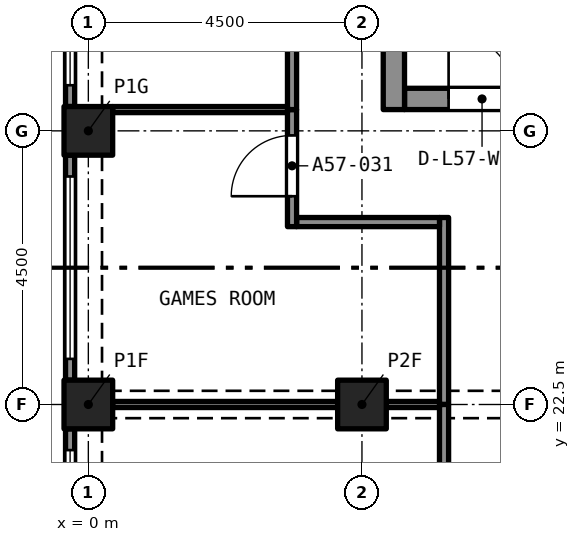
"""IFC4 building model, lengths in metres.
Left out: names, types, materials, properties, quantities, classifications, styles, units other than length and angle.
Written with IfcOpenShell. Run it as: python <this file> out.ifc"""

import sys

from ifc_helpers import new_model, si_unit, direction, frame, frame_2d, origin, origin_2d, place, context, subcontext, project, spatial, rectangle, extrude, element, fill, save


model = new_model("IFC4")
c1 = context("Model", 3, precision=1e-05, world=origin(), true_north=direction((0.0, 1.0)))
c2 = subcontext(c1, "Body", "Model", "MODEL_VIEW")
j1 = project(units=[si_unit("LENGTHUNIT", "METRE"), si_unit("PLANEANGLEUNIT", "RADIAN")], contexts=[c1])
p1 = place(None, origin())
s1 = spatial("IfcSite", under=j1, at=p1, CompositionType="ELEMENT")
p2 = place(p1, origin())
s2 = spatial("IfcBuilding", under=s1, at=p2, CompositionType="ELEMENT")
p3 = place(p2, frame((0.0, 0.0, 206.895)))
s3 = spatial("IfcBuildingStorey", under=s2, at=p3, CompositionType="ELEMENT", Elevation=206.895)
for number, where, z_axis, x_axis in (
    (1, (0.0, 22.5, 0.0), (0.0, 0.0, 1.0), (1.0, 0.0, 0.0)),
    (2, (4.5, 22.5, 0.0), (0.0, 0.0, 1.0), (1.0, 0.0, 0.0)),
    (3, (0.0, 27.0, 0.0), (0.0, 0.0, 1.0), (1.0, 0.0, 0.0)),
):
    element("IfcColumn", number, at=place(p3, frame(where, z_axis=z_axis, x_axis=x_axis)), inside=s3, PredefinedType="COLUMN", context=c2, shape_type="SweptSolid", body=[
        extrude(rectangle(XDim=0.8, YDim=0.8, at=origin_2d()), origin(), (0.0, 0.0, 1.0), 3.2),
    ])
p4 = place(p3, frame((5.2, 27.525, 0.0), z_axis=(0.0, 0.0, 1.0), x_axis=(1.0, 0.0, 0.0)))
e4 = element("IfcWall", 4, at=p4, inside=s3, PredefinedType="SOLIDWALL", context=c2, shape_type="SweptSolid", body=[
    extrude(rectangle(XDim=7.6, YDim=0.35, at=frame_2d((3.8, 0.0))), origin(), (0.0, 0.0, 1.0), 3.2),
])
p5 = place(p4, frame((0.725, 0.0, 0.0)))
e5 = element("IfcOpeningElement", 5, at=p5, cuts=e4, PredefinedType="OPENING", context=c2, shape_type="SweptSolid", body=[
    extrude(rectangle(XDim=1.1, YDim=2.1, at=frame_2d((0.55, 1.05))), frame((0.0, 0.185, 0.0), z_axis=(0.0, -1.0, 0.0), x_axis=(1.0, 0.0, 0.0)), (0.0, 0.0, 1.0), 0.37),
])
p6 = place(p4, frame((3.25, 0.0, 0.0)))
e6 = element("IfcOpeningElement", 6, at=p6, cuts=e4, PredefinedType="OPENING", context=c2, shape_type="SweptSolid", body=[
    extrude(rectangle(XDim=1.1, YDim=2.1, at=frame_2d((0.55, 1.05))), frame((0.0, 0.185, 0.0), z_axis=(0.0, -1.0, 0.0), x_axis=(1.0, 0.0, 0.0)), (0.0, 0.0, 1.0), 0.37),
])
p7 = place(p4, frame((5.775, 0.0, 0.0)))
e7 = element("IfcOpeningElement", 7, at=p7, cuts=e4, PredefinedType="OPENING", context=c2, shape_type="SweptSolid", body=[
    extrude(rectangle(XDim=1.1, YDim=2.1, at=frame_2d((0.55, 1.05))), frame((0.0, 0.185, 0.0), z_axis=(0.0, -1.0, 0.0), x_axis=(1.0, 0.0, 0.0)), (0.0, 0.0, 1.0), 0.37),
])
p8 = place(p3, frame((5.025, 27.35, 0.0), z_axis=(0.0, 0.0, 1.0), x_axis=(0.0, 1.0, 0.0)))
e8 = element("IfcWall", 8, at=p8, inside=s3, PredefinedType="SOLIDWALL", context=c2, shape_type="SweptSolid", body=[
    extrude(rectangle(XDim=12.8, YDim=0.35, at=frame_2d((6.4, 0.0))), origin(), (0.0, 0.0, 1.0), 3.2),
])
p9 = place(p8, frame((8.6, 0.0, 0.0)))
e9 = element("IfcOpeningElement", 9, at=p9, cuts=e8, PredefinedType="OPENING", context=c2, shape_type="SweptSolid", body=[
    extrude(rectangle(XDim=1.2, YDim=2.1, at=frame_2d((0.6, 1.05))), frame((0.0, 0.185, 0.0), z_axis=(0.0, -1.0, 0.0), x_axis=(1.0, 0.0, 0.0)), (0.0, 0.0, 1.0), 0.37),
])
p10 = place(p3, frame((-0.3, 27.4, 0.0), z_axis=(0.0, 0.0, 1.0), x_axis=(0.0, 1.0, 0.0)))
e10 = element("IfcWall", 10, at=p10, inside=s3, PredefinedType="SOLIDWALL", context=c2, shape_type="SweptSolid", body=[
    extrude(rectangle(XDim=3.7, YDim=0.15, at=frame_2d((1.85, 0.0))), origin(), (0.0, 0.0, 1.0), 3.2),
])
p11 = place(p10, frame((0.35, 0.0, 0.45)))
e11 = element("IfcOpeningElement", 11, at=p11, cuts=e10, PredefinedType="OPENING", context=c2, shape_type="SweptSolid", body=[
    extrude(rectangle(XDim=3.0, YDim=1.95, at=frame_2d((1.5, 0.975))), frame((0.0, 0.085, 0.0), z_axis=(0.0, -1.0, 0.0), x_axis=(1.0, 0.0, 0.0)), (0.0, 0.0, 1.0), 0.17),
])
p12 = place(p3, frame((-0.3, 22.9, 0.0), z_axis=(0.0, 0.0, 1.0), x_axis=(0.0, 1.0, 0.0)))
e12 = element("IfcWall", 12, at=p12, inside=s3, PredefinedType="SOLIDWALL", context=c2, shape_type="SweptSolid", body=[
    extrude(rectangle(XDim=3.7, YDim=0.15, at=frame_2d((1.85, 0.0))), origin(), (0.0, 0.0, 1.0), 3.2),
])
p13 = place(p12, frame((0.35, 0.0, 0.45)))
e13 = element("IfcOpeningElement", 13, at=p13, cuts=e12, PredefinedType="OPENING", context=c2, shape_type="SweptSolid", body=[
    extrude(rectangle(XDim=3.0, YDim=1.95, at=frame_2d((1.5, 0.975))), frame((0.0, 0.085, 0.0), z_axis=(0.0, -1.0, 0.0), x_axis=(1.0, 0.0, 0.0)), (0.0, 0.0, 1.0), 0.17),
])
p14 = place(p3, frame((-0.3, 18.4, 0.0), z_axis=(0.0, 0.0, 1.0), x_axis=(0.0, 1.0, 0.0)))
e14 = element("IfcWall", 14, at=p14, inside=s3, PredefinedType="SOLIDWALL", context=c2, shape_type="SweptSolid", body=[
    extrude(rectangle(XDim=3.7, YDim=0.15, at=frame_2d((1.85, 0.0))), origin(), (0.0, 0.0, 1.0), 3.2),
])
p15 = place(p14, frame((0.35, 0.0, 0.45)))
e15 = element("IfcOpeningElement", 15, at=p15, cuts=e14, PredefinedType="OPENING", context=c2, shape_type="SweptSolid", body=[
    extrude(rectangle(XDim=3.0, YDim=1.95, at=frame_2d((1.5, 0.975))), frame((0.0, 0.085, 0.0), z_axis=(0.0, -1.0, 0.0), x_axis=(1.0, 0.0, 0.0)), (0.0, 0.0, 1.0), 0.17),
])
p16 = place(p3, frame((5.85, 22.5, 0.0), z_axis=(0.0, 0.0, 1.0), x_axis=(0.0, 1.0, 0.0)))
e16 = element("IfcWall", 16, at=p16, inside=s3, PredefinedType="PARTITIONING", context=c2, shape_type="SweptSolid", body=[
    extrude(rectangle(XDim=3.075, YDim=0.15, at=frame_2d((1.538, 0.0))), origin(), (0.0, 0.0, 1.0), 2.9),
])
p17 = place(p3, frame((3.425, 25.5, 0.0), z_axis=(0.0, 0.0, 1.0), x_axis=(1.0, 0.0, 0.0)))
e17 = element("IfcWall", 17, at=p17, inside=s3, PredefinedType="PARTITIONING", context=c2, shape_type="SweptSolid", body=[
    extrude(rectangle(XDim=2.35, YDim=0.15, at=frame_2d((1.175, 0.0))), origin(), (0.0, 0.0, 1.0), 2.9),
])
p18 = place(p3, frame((3.35, 25.425, 0.0), z_axis=(0.0, 0.0, 1.0), x_axis=(0.0, 1.0, 0.0)))
e18 = element("IfcWall", 18, at=p18, inside=s3, PredefinedType="PARTITIONING", context=c2, shape_type="SweptSolid", body=[
    extrude(rectangle(XDim=1.925, YDim=0.15, at=frame_2d((0.962, 0.0))), origin(), (0.0, 0.0, 1.0), 2.9),
])
p19 = place(p18, frame((0.5, 0.0, 0.0)))
e19 = element("IfcOpeningElement", 19, at=p19, cuts=e18, PredefinedType="OPENING", context=c2, shape_type="SweptSolid", body=[
    extrude(rectangle(XDim=1.0, YDim=2.1, at=frame_2d((0.5, 1.05))), frame((0.0, 0.085, 0.0), z_axis=(0.0, -1.0, 0.0), x_axis=(1.0, 0.0, 0.0)), (0.0, 0.0, 1.0), 0.17),
])
p20 = place(p3, frame((3.35, 27.35, 0.0), z_axis=(0.0, 0.0, 1.0), x_axis=(0.0, 1.0, 0.0)))
e20 = element("IfcWall", 20, at=p20, inside=s3, PredefinedType="PARTITIONING", context=c2, shape_type="SweptSolid", body=[
    extrude(rectangle(XDim=4.15, YDim=0.15, at=frame_2d((2.075, 0.0))), origin(), (0.0, 0.0, 1.0), 2.9),
])
p21 = place(p20, frame((1.575, 0.0, 0.0)))
e21 = element("IfcOpeningElement", 21, at=p21, cuts=e20, PredefinedType="OPENING", context=c2, shape_type="SweptSolid", body=[
    extrude(rectangle(XDim=1.0, YDim=2.1, at=frame_2d((0.5, 1.05))), frame((0.0, 0.085, 0.0), z_axis=(0.0, -1.0, 0.0), x_axis=(1.0, 0.0, 0.0)), (0.0, 0.0, 1.0), 0.17),
])
p22 = place(p3, frame((5.85, 13.025, 0.0), z_axis=(0.0, 0.0, 1.0), x_axis=(0.0, 1.0, 0.0)))
e22 = element("IfcWall", 22, at=p22, inside=s3, PredefinedType="PARTITIONING", context=c2, shape_type="SweptSolid", body=[
    extrude(rectangle(XDim=9.475, YDim=0.15, at=frame_2d((4.738, 0.0))), origin(), (0.0, 0.0, 1.0), 2.9),
])
p23 = place(p22, frame((4.275, 0.0, 0.0)))
e23 = element("IfcOpeningElement", 23, at=p23, cuts=e22, PredefinedType="OPENING", context=c2, shape_type="SweptSolid", body=[
    extrude(rectangle(XDim=1.0, YDim=2.1, at=frame_2d((0.5, 1.05))), frame((0.0, 0.085, 0.0), z_axis=(0.0, -1.0, 0.0), x_axis=(1.0, 0.0, 0.0)), (0.0, 0.0, 1.0), 0.17),
])
p24 = place(p3, frame((0.4, 27.35, 0.0), z_axis=(0.0, 0.0, 1.0), x_axis=(1.0, 0.0, 0.0)))
e24 = element("IfcWall", 24, at=p24, inside=s3, PredefinedType="PARTITIONING", context=c2, shape_type="SweptSolid", body=[
    extrude(rectangle(XDim=2.875, YDim=0.1, at=frame_2d((1.438, 0.0))), origin(), (0.0, 0.0, 1.0), 2.9),
])
p25 = place(p3, frame((4.9, 22.5, 0.0), z_axis=(0.0, 0.0, 1.0), x_axis=(1.0, 0.0, 0.0)))
e25 = element("IfcWall", 25, at=p25, inside=s3, PredefinedType="PARTITIONING", context=c2, shape_type="SweptSolid", body=[
    extrude(rectangle(XDim=0.875, YDim=0.1, at=frame_2d((0.438, 0.0))), origin(), (0.0, 0.0, 1.0), 2.38),
])
p26 = place(p3, frame((0.4, 22.5, 0.0), z_axis=(0.0, 0.0, 1.0), x_axis=(1.0, 0.0, 0.0)))
e26 = element("IfcWall", 26, at=p26, inside=s3, PredefinedType="PARTITIONING", context=c2, shape_type="SweptSolid", body=[
    extrude(rectangle(XDim=3.7, YDim=0.1, at=frame_2d((1.85, 0.0))), origin(), (0.0, 0.0, 1.0), 2.38),
])
p27 = place(p11, origin())
e27 = element("IfcWindow", 27, at=p27, inside=s3, PartitioningType="SINGLE_PANEL", PredefinedType="WINDOW", context=c2, shape_type="SweptSolid", body=[
    extrude(rectangle(XDim=3.0, YDim=1.95, at=frame_2d((1.5, 0.975))), frame((0.0, 0.03, 0.0), z_axis=(0.0, -1.0, 0.0), x_axis=(1.0, 0.0, 0.0)), (0.0, 0.0, 1.0), 0.06),
])
fill(e11, e27)
p28 = place(p13, origin())
e28 = element("IfcWindow", 28, at=p28, inside=s3, PartitioningType="SINGLE_PANEL", PredefinedType="WINDOW", context=c2, shape_type="SweptSolid", body=[
    extrude(rectangle(XDim=3.0, YDim=1.95, at=frame_2d((1.5, 0.975))), frame((0.0, 0.03, 0.0), z_axis=(0.0, -1.0, 0.0), x_axis=(1.0, 0.0, 0.0)), (0.0, 0.0, 1.0), 0.06),
])
fill(e13, e28)
p29 = place(p15, origin())
e29 = element("IfcWindow", 29, at=p29, inside=s3, PartitioningType="SINGLE_PANEL", PredefinedType="WINDOW", context=c2, shape_type="SweptSolid", body=[
    extrude(rectangle(XDim=3.0, YDim=1.95, at=frame_2d((1.5, 0.975))), frame((0.0, 0.03, 0.0), z_axis=(0.0, -1.0, 0.0), x_axis=(1.0, 0.0, 0.0)), (0.0, 0.0, 1.0), 0.06),
])
fill(e15, e29)
p30 = place(p19, origin())
e30 = element("IfcDoor", 30, at=p30, inside=s3, OperationType="SINGLE_SWING_RIGHT", PredefinedType="DOOR", context=c2, shape_type="SweptSolid", body=[
    extrude(rectangle(XDim=1.0, YDim=2.1, at=frame_2d((0.5, 1.05))), frame((0.0, 0.025, 0.0), z_axis=(0.0, -1.0, 0.0), x_axis=(1.0, 0.0, 0.0)), (0.0, 0.0, 1.0), 0.05),
])
fill(e19, e30)
p31 = place(p5, origin())
e31 = element("IfcDoor", 31, at=p31, inside=s3, OperationType="SINGLE_SWING_LEFT", PredefinedType="DOOR", context=c2, shape_type="SweptSolid", body=[
    extrude(rectangle(XDim=1.1, YDim=2.1, at=frame_2d((0.55, 1.05))), frame((0.0, 0.025, 0.0), z_axis=(0.0, -1.0, 0.0), x_axis=(1.0, 0.0, 0.0)), (0.0, 0.0, 1.0), 0.05),
])
fill(e5, e31)
save(model, sys.argv[1])
